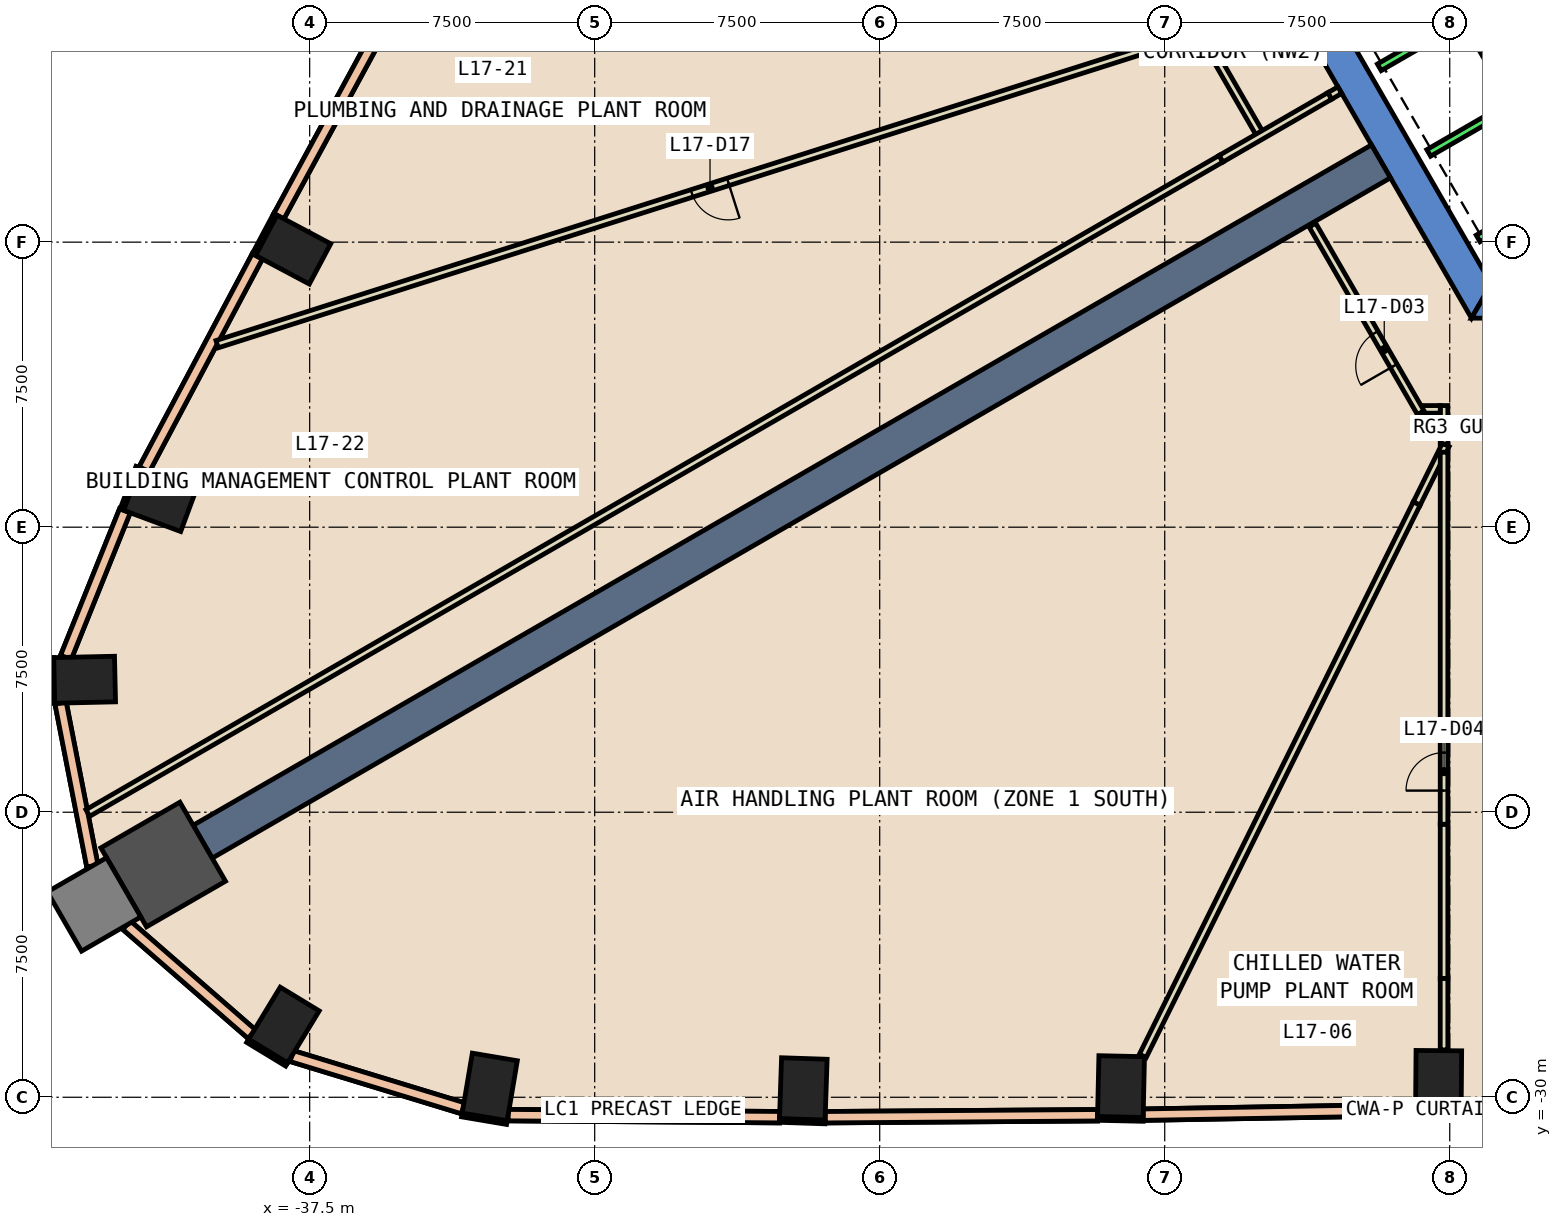
"""IFC4 building model, lengths in metres.
Left out: names, types, materials, properties, quantities, classifications, styles, units other than length and angle.
Written with IfcOpenShell. Run it as: python <this file> out.ifc"""

import sys

from ifc_helpers import new_model, si_unit, direction, frame, frame_2d, origin, origin_2d, place, context, subcontext, project, spatial, polyline, rectangle, outline, extrude, element, fill, save


model = new_model("IFC4")
c1 = context("Model", 3, precision=1e-05, world=origin(), true_north=direction((0.0, 1.0)))
c2 = subcontext(c1, "Body", "Model", "MODEL_VIEW")
j1 = project(units=[si_unit("LENGTHUNIT", "METRE"), si_unit("PLANEANGLEUNIT", "RADIAN")], contexts=[c1])
p1 = place(None, origin())
s1 = spatial("IfcSite", under=j1, at=p1, CompositionType="ELEMENT")
p2 = place(p1, origin())
s2 = spatial("IfcBuilding", under=s1, at=p2, CompositionType="ELEMENT")
p3 = place(p2, frame((0.0, 0.0, 81.2)))
s3 = spatial("IfcBuildingStorey", under=s2, at=p3, CompositionType="ELEMENT", Elevation=81.2)
for number, where, z_axis, x_axis in (
    (1, (-32.761, -29.728, -0.6), (0.0, 0.0, 1.0), (-0.986, 0.167, 0.0)),
    (2, (-24.51, -29.78, -0.6), (0.0, 0.0, 1.0), (-0.999, 0.034, 0.0)),
    (3, (-16.15, -29.719, -0.6), (0.0, 0.0, 1.0), (-1.0, 0.022, 0.0)),
    (4, (-7.793, -29.573, -0.6), (0.0, 0.0, 1.0), (-1.0, 0.008, 0.0)),
    (5, (-37.934, -7.697, -0.6), (0.0, 0.0, 1.0), (0.469, 0.883, 0.0)),
    (6, (-41.435, -14.273, -0.6), (0.0, 0.0, 1.0), (0.348, 0.937, 0.0)),
    (7, (-43.422, -19.014, -0.6), (0.0, 0.0, 1.0), (-0.023, 1.0, 0.0)),
):
    element("IfcColumn", number, at=place(p3, frame(where, z_axis=z_axis, x_axis=x_axis)), inside=s3, PredefinedType="COLUMN", context=c2, shape_type="SweptSolid", body=[
        extrude(rectangle(XDim=1.2, YDim=1.6, at=origin_2d()), origin(), (0.0, 0.0, 1.0), 5.4),
    ])
p4 = place(p3, frame((-41.354, -23.876, -0.6), z_axis=(0.0, 0.0, 1.0), x_axis=(0.866025403784, 0.5, 0.0)))
e8 = element("IfcColumn", 8, at=p4, inside=s3, PredefinedType="COLUMN", context=c2, shape_type="SweptSolid", body=[
    extrude(rectangle(XDim=2.4, YDim=2.4, at=origin_2d()), origin(), (0.0, 0.0, 1.0), 5.4),
])
p5 = place(p3, frame((-38.177, -28.099, -0.6), z_axis=(0.0, 0.0, 1.0), x_axis=(-0.854522294989, 0.519414716163, 0.0)))
e9 = element("IfcColumn", 9, at=p5, inside=s3, PredefinedType="COLUMN", context=c2, shape_type="SweptSolid", body=[
    extrude(rectangle(XDim=1.2, YDim=1.6, at=origin_2d()), origin(), (0.0, 0.0, 1.0), 5.4),
])
p6 = place(p3, frame((-43.173, -24.926, -0.6), z_axis=(0.0, 0.0, 1.0), x_axis=(0.866025403784, 0.5, 0.0)))
e10 = element("IfcColumn", 10, at=p6, inside=s3, PredefinedType="COLUMN", context=c2, shape_type="SweptSolid", body=[
    extrude(rectangle(XDim=1.8, YDim=1.8, at=origin_2d()), origin(), (0.0, 0.0, 1.0), 5.4),
])
p7 = place(p3, frame((0.0, 0.0, -0.6)))
e11 = element("IfcWall", 11, at=p7, inside=s3, PredefinedType="SHEAR", context=c2, shape_type="SweptSolid", body=[
    extrude(outline(polyline([(-13.856, 2.5), (-6.928, -9.5), (-6.409, -8.6), (-12.817, 2.5), (-13.856, 2.5)])), origin(), (0.0, 0.0, 1.0), 5.4),
])
p8 = place(p3, frame((0.0, 0.0, -0.6)))
e12 = element("IfcWall", 12, at=p8, inside=s3, PredefinedType="SHEAR", context=c2, shape_type="SweptSolid", body=[
    extrude(outline(polyline([(3.75, -9.5), (3.75, -8.6), (-6.409, -8.6), (-6.928, -9.5), (3.75, -9.5)])), origin(), (0.0, 0.0, 1.0), 5.4),
])
p9 = place(p3, frame((-9.31, -5.375, 0.0), z_axis=(0.0, 0.0, 1.0), x_axis=(-0.866022967049, -0.500004220526, 0.0)))
e13 = element("IfcWall", 13, at=p9, inside=s3, PredefinedType="SHEAR", context=c2, shape_type="SweptSolid", body=[
    extrude(rectangle(XDim=35.802, YDim=1.0, at=frame_2d((17.901, 0.0))), origin(), (0.0, 0.0, 1.0), 4.8),
])
p10 = place(p3, frame((-38.403, -6.769, 0.0), z_axis=(0.0, 0.0, 1.0), x_axis=(-0.469467784567, -0.882949601763, 0.0)))
e14 = element("IfcWall", 14, at=p10, inside=s3, PredefinedType="STANDARD", context=c2, shape_type="SweptSolid", body=[
    extrude(rectangle(XDim=1.199, YDim=0.1, at=frame_2d((0.6, 0.0))), origin(), (0.0, 0.0, 1.0), 4.8),
])
p11 = place(p3, frame((-42.023, -13.415, 0.0), z_axis=(0.0, 0.0, 1.0), x_axis=(-0.348268249601, -0.937394914814, 0.0)))
e15 = element("IfcWall", 15, at=p11, inside=s3, PredefinedType="STANDARD", context=c2, shape_type="SweptSolid", body=[
    extrude(rectangle(XDim=1.2, YDim=0.1, at=frame_2d((0.6, 0.0))), origin(), (0.0, 0.0, 1.0), 4.8),
])
for number, where, z_axis, x_axis in (
    (16, (-33.494, -30.466, 0.0), (0.0, 0.0, 1.0), (0.986, -0.167, 0.0)),
    (17, (-25.138, -30.609, 0.0), (0.0, 0.0, 1.0), (0.999, -0.033, 0.0)),
):
    element("IfcWall", number, at=place(p3, frame(where, z_axis=z_axis, x_axis=x_axis)), inside=s3, PredefinedType="STANDARD", context=c2, shape_type="SweptSolid", body=[
        extrude(rectangle(XDim=1.2, YDim=0.1, at=frame_2d((0.6, 0.0))), origin(), (0.0, 0.0, 1.0), 4.8),
    ])
p12 = place(p3, frame((-16.769, -30.556, 0.0), z_axis=(0.0, 0.0, 1.0), x_axis=(0.999763115755, -0.021764934565, 0.0)))
e18 = element("IfcWall", 18, at=p12, inside=s3, PredefinedType="STANDARD", context=c2, shape_type="SweptSolid", body=[
    extrude(rectangle(XDim=1.2, YDim=0.1, at=frame_2d((0.6, 0.0))), origin(), (0.0, 0.0, 1.0), 4.8),
])
p13 = place(p3, frame((-8.4, -30.418, 0.0), z_axis=(0.0, 0.0, 1.0), x_axis=(0.999965208912, -0.008341520563, 0.0)))
e19 = element("IfcWall", 19, at=p13, inside=s3, PredefinedType="STANDARD", context=c2, shape_type="SweptSolid", body=[
    extrude(rectangle(XDim=1.2, YDim=0.1, at=frame_2d((0.6, 0.0))), origin(), (0.0, 0.0, 1.0), 4.8),
])
p14 = place(p3, frame((-44.286, -18.433, 0.0), z_axis=(0.0, 0.0, 1.0), x_axis=(0.023188066684, -0.999731120634, 0.0)))
e20 = element("IfcWall", 20, at=p14, inside=s3, PredefinedType="STANDARD", context=c2, shape_type="SweptSolid", body=[
    extrude(rectangle(XDim=1.2, YDim=0.1, at=frame_2d((0.6, 0.0))), origin(), (0.0, 0.0, 1.0), 4.8),
])
p15 = place(p3, frame((-39.131, -28.514, 0.0), z_axis=(0.0, 0.0, 1.0), x_axis=(0.854771404281, -0.51900466898, 0.0)))
e21 = element("IfcWall", 21, at=p15, inside=s3, PredefinedType="STANDARD", context=c2, shape_type="SweptSolid", body=[
    extrude(rectangle(XDim=1.2, YDim=0.1, at=frame_2d((0.6, 0.0))), origin(), (0.0, 0.0, 1.0), 4.8),
])
p16 = place(p3, frame((-32.279, -30.47, 0.0), z_axis=(0.0, 0.0, 1.0), x_axis=(0.999971489211, -0.007551209565, 0.0)))
e22 = element("IfcWall", 22, at=p16, inside=s3, PredefinedType="STANDARD", context=c2, shape_type="SweptSolid", body=[
    extrude(rectangle(XDim=7.145, YDim=0.3, at=frame_2d((3.573, 0.0))), origin(), (0.0, 0.0, 1.0), 1.2),
])
p17 = place(p3, frame((-32.279, -30.47, 4.0), z_axis=(0.0, 0.0, 1.0), x_axis=(0.999971489211, -0.007551209565, 0.0)))
e23 = element("IfcWall", 23, at=p17, inside=s3, PredefinedType="STANDARD", context=c2, shape_type="SweptSolid", body=[
    extrude(rectangle(XDim=7.145, YDim=0.3, at=frame_2d((3.573, 0.0))), origin(), (0.0, 0.0, 1.0), 0.8),
])
p18 = place(p3, frame((-23.935, -30.525, 0.0), z_axis=(0.0, 0.0, 1.0), x_axis=(0.999973692375, 0.007253589309, 0.0)))
e24 = element("IfcWall", 24, at=p18, inside=s3, PredefinedType="STANDARD", context=c2, shape_type="SweptSolid", body=[
    extrude(rectangle(XDim=7.169, YDim=0.3, at=frame_2d((3.584, 0.0))), origin(), (0.0, 0.0, 1.0), 1.2),
])
p19 = place(p3, frame((-23.935, -30.525, 4.0), z_axis=(0.0, 0.0, 1.0), x_axis=(0.999973692375, 0.007253589309, 0.0)))
e25 = element("IfcWall", 25, at=p19, inside=s3, PredefinedType="STANDARD", context=c2, shape_type="SweptSolid", body=[
    extrude(rectangle(XDim=7.169, YDim=0.3, at=frame_2d((3.584, 0.0))), origin(), (0.0, 0.0, 1.0), 0.8),
])
p20 = place(p3, frame((-15.567, -30.458, 0.0), z_axis=(0.0, 0.0, 1.0), x_axis=(0.999848022085, 0.017433666643, 0.0)))
e26 = element("IfcWall", 26, at=p20, inside=s3, PredefinedType="STANDARD", context=c2, shape_type="SweptSolid", body=[
    extrude(rectangle(XDim=7.17, YDim=0.3, at=frame_2d((3.585, 0.0))), origin(), (0.0, 0.0, 1.0), 1.2),
])
p21 = place(p3, frame((-15.567, -30.458, 4.0), z_axis=(0.0, 0.0, 1.0), x_axis=(0.999848022085, 0.017433666643, 0.0)))
e27 = element("IfcWall", 27, at=p21, inside=s3, PredefinedType="STANDARD", context=c2, shape_type="SweptSolid", body=[
    extrude(rectangle(XDim=7.17, YDim=0.3, at=frame_2d((3.585, 0.0))), origin(), (0.0, 0.0, 1.0), 0.8),
])
p22 = place(p3, frame((-35.386, -1.426, 0.0), z_axis=(0.0, 0.0, 1.0), x_axis=(-0.476762519224, -0.879032138356, 0.0)))
e28 = element("IfcWall", 28, at=p22, inside=s3, PredefinedType="STANDARD", context=c2, shape_type="SweptSolid", body=[
    extrude(rectangle(XDim=6.135, YDim=0.3, at=frame_2d((3.068, 0.0))), origin(), (0.0, 0.0, 1.0), 1.2),
])
p23 = place(p3, frame((-35.386, -1.426, 4.0), z_axis=(0.0, 0.0, 1.0), x_axis=(-0.476762519224, -0.879032138356, 0.0)))
e29 = element("IfcWall", 29, at=p23, inside=s3, PredefinedType="STANDARD", context=c2, shape_type="SweptSolid", body=[
    extrude(rectangle(XDim=6.135, YDim=0.3, at=frame_2d((3.068, 0.0))), origin(), (0.0, 0.0, 1.0), 0.8),
])
p24 = place(p3, frame((-38.877, -7.874, 0.0), z_axis=(0.0, 0.0, 1.0), x_axis=(-0.469082096551, -0.883154565575, 0.0)))
e30 = element("IfcWall", 30, at=p24, inside=s3, PredefinedType="STANDARD", context=c2, shape_type="SweptSolid", body=[
    extrude(rectangle(XDim=6.346, YDim=0.3, at=frame_2d((3.173, 0.0))), origin(), (0.0, 0.0, 1.0), 1.2),
])
p25 = place(p3, frame((-38.877, -7.874, 4.0), z_axis=(0.0, 0.0, 1.0), x_axis=(-0.469082096551, -0.883154565575, 0.0)))
e31 = element("IfcWall", 31, at=p25, inside=s3, PredefinedType="STANDARD", context=c2, shape_type="SweptSolid", body=[
    extrude(rectangle(XDim=6.346, YDim=0.3, at=frame_2d((3.173, 0.0))), origin(), (0.0, 0.0, 1.0), 0.8),
])
p26 = place(p3, frame((-42.362, -14.568, 0.0), z_axis=(0.0, 0.0, 1.0), x_axis=(-0.373424226069, -0.92766068548, 0.0)))
e32 = element("IfcWall", 32, at=p26, inside=s3, PredefinedType="STANDARD", context=c2, shape_type="SweptSolid", body=[
    extrude(rectangle(XDim=4.159, YDim=0.3, at=frame_2d((2.079, 0.0))), origin(), (0.0, 0.0, 1.0), 1.2),
])
p27 = place(p3, frame((-42.362, -14.568, 4.0), z_axis=(0.0, 0.0, 1.0), x_axis=(-0.373424226069, -0.92766068548, 0.0)))
e33 = element("IfcWall", 33, at=p27, inside=s3, PredefinedType="STANDARD", context=c2, shape_type="SweptSolid", body=[
    extrude(rectangle(XDim=4.159, YDim=0.3, at=frame_2d((2.079, 0.0))), origin(), (0.0, 0.0, 1.0), 0.8),
])
p28 = place(p3, frame((-44.054, -19.627, 0.0), z_axis=(0.0, 0.0, 1.0), x_axis=(0.191384281913, -0.981515184109, 0.0)))
e34 = element("IfcWall", 34, at=p28, inside=s3, PredefinedType="STANDARD", context=c2, shape_type="SweptSolid", body=[
    extrude(rectangle(XDim=4.368, YDim=0.3, at=frame_2d((2.184, 0.0))), origin(), (0.0, 0.0, 1.0), 1.2),
])
p29 = place(p3, frame((-44.054, -19.627, 4.0), z_axis=(0.0, 0.0, 1.0), x_axis=(0.191384281913, -0.981515184109, 0.0)))
e35 = element("IfcWall", 35, at=p29, inside=s3, PredefinedType="STANDARD", context=c2, shape_type="SweptSolid", body=[
    extrude(rectangle(XDim=4.368, YDim=0.3, at=frame_2d((2.184, 0.0))), origin(), (0.0, 0.0, 1.0), 0.8),
])
p30 = place(p3, frame((-42.319, -25.471, 0.0), z_axis=(0.0, 0.0, 1.0), x_axis=(0.754384139839, -0.656433217897, 0.0)))
e36 = element("IfcWall", 36, at=p30, inside=s3, PredefinedType="STANDARD", context=c2, shape_type="SweptSolid", body=[
    extrude(rectangle(XDim=4.369, YDim=0.3, at=frame_2d((2.185, 0.0))), origin(), (0.0, 0.0, 1.0), 1.2),
])
p31 = place(p3, frame((-42.319, -25.471, 4.0), z_axis=(0.0, 0.0, 1.0), x_axis=(0.754384139839, -0.656433217897, 0.0)))
e37 = element("IfcWall", 37, at=p31, inside=s3, PredefinedType="STANDARD", context=c2, shape_type="SweptSolid", body=[
    extrude(rectangle(XDim=4.369, YDim=0.3, at=frame_2d((2.185, 0.0))), origin(), (0.0, 0.0, 1.0), 0.8),
])
p32 = place(p3, frame((-37.972, -28.916, 0.0), z_axis=(0.0, 0.0, 1.0), x_axis=(0.956550822453, -0.291565642806, 0.0)))
e38 = element("IfcWall", 38, at=p32, inside=s3, PredefinedType="STANDARD", context=c2, shape_type="SweptSolid", body=[
    extrude(rectangle(XDim=4.713, YDim=0.3, at=frame_2d((2.356, 0.0))), origin(), (0.0, 0.0, 1.0), 1.2),
])
p33 = place(p3, frame((-37.972, -28.916, 4.0), z_axis=(0.0, 0.0, 1.0), x_axis=(0.956550822453, -0.291565642806, 0.0)))
e39 = element("IfcWall", 39, at=p33, inside=s3, PredefinedType="STANDARD", context=c2, shape_type="SweptSolid", body=[
    extrude(rectangle(XDim=4.713, YDim=0.3, at=frame_2d((2.356, 0.0))), origin(), (0.0, 0.0, 1.0), 0.8),
])
p34 = place(p3, frame((-5.492, -3.788, 0.0), z_axis=(0.0, 0.0, 1.0), x_axis=(-0.500008949224, 0.866020236886, 0.0)))
e40 = element("IfcWall", 40, at=p34, inside=s3, PredefinedType="PARTITIONING", context=c2, shape_type="SweptSolid", body=[
    extrude(rectangle(XDim=2.68, YDim=0.2, at=frame_2d((1.34, 0.0))), origin(), (0.0, 0.0, 1.0), 4.8),
])
p35 = place(p3, frame((-7.65, -12.826, 0.0), z_axis=(0.0, 0.0, 1.0), x_axis=(0.0, 1.0, 0.0)))
e41 = element("IfcWall", 41, at=p35, inside=s3, PredefinedType="PARTITIONING", context=c2, shape_type="SweptSolid", body=[
    extrude(rectangle(XDim=1.026, YDim=0.2, at=frame_2d((0.513, 0.0))), origin(), (0.0, 0.0, 1.0), 2.4),
])
p36 = place(p3, frame((-7.75, -11.9, 0.0), z_axis=(0.0, 0.0, 1.0), x_axis=(-1.0, 0.0, 0.0)))
e42 = element("IfcWall", 42, at=p36, inside=s3, PredefinedType="PARTITIONING", context=c2, shape_type="SweptSolid", body=[
    extrude(rectangle(XDim=0.464, YDim=0.2, at=frame_2d((0.232, 0.0))), origin(), (0.0, 0.0, 1.0), 2.4),
])
p37 = place(p3, frame((-8.264, -11.987, 0.0), z_axis=(0.0, 0.0, 1.0), x_axis=(-0.499907863044, 0.866078592546, 0.0)))
e43 = element("IfcWall", 43, at=p37, inside=s3, PredefinedType="PARTITIONING", context=c2, shape_type="SweptSolid", body=[
    extrude(rectangle(XDim=5.699, YDim=0.2, at=frame_2d((2.85, 0.0))), origin(), (0.0, 0.0, 1.0), 4.8),
])
p38 = place(p37, frame((1.419, 0.0, 0.0)))
e44 = element("IfcOpeningElement", 44, at=p38, cuts=e43, PredefinedType="OPENING", context=c2, shape_type="SweptSolid", body=[
    extrude(rectangle(XDim=1.0, YDim=2.1, at=frame_2d((0.5, 1.05))), frame((0.0, 0.11, 0.0), z_axis=(0.0, -1.0, 0.0), x_axis=(1.0, 0.0, 0.0)), (0.0, 0.0, 1.0), 0.22),
])
p39 = place(p3, frame((-7.65, -28.754, 0.0), z_axis=(0.0, 0.0, 1.0), x_axis=(0.0, 1.0, 0.0)))
e45 = element("IfcWall", 45, at=p39, inside=s3, PredefinedType="PARTITIONING", context=c2, shape_type="SweptSolid", body=[
    extrude(rectangle(XDim=1.882, YDim=0.2, at=frame_2d((0.941, 0.0))), origin(), (0.0, 0.0, 1.0), 4.8),
])
p40 = place(p3, frame((-7.606, -12.836, 0.0), z_axis=(0.0, 0.0, 1.0), x_axis=(-0.444033028639, -0.896010418175, 0.0)))
e46 = element("IfcWall", 46, at=p40, inside=s3, PredefinedType="PARTITIONING", context=c2, shape_type="SweptSolid", body=[
    extrude(rectangle(XDim=1.721, YDim=0.2, at=frame_2d((0.86, 0.0))), origin(), (0.0, 0.0, 1.0), 2.4),
])
p41 = place(p3, frame((-10.392, -3.5, 0.0), z_axis=(0.0, 0.0, 1.0), x_axis=(-0.866040446274, -0.499973944738, 0.0)))
e47 = element("IfcWall", 47, at=p41, inside=s3, PredefinedType="PARTITIONING", context=c2, shape_type="SweptSolid", body=[
    extrude(rectangle(XDim=0.308, YDim=0.2, at=frame_2d((0.154, 0.0))), origin(), (0.0, 0.0, 1.0), 1.7),
])
p42 = place(p3, frame((-43.337, -22.52, 0.0), z_axis=(0.0, 0.0, 1.0), x_axis=(0.866035864772, 0.4999818806, 0.0)))
e48 = element("IfcWall", 48, at=p42, inside=s3, PredefinedType="PARTITIONING", context=c2, shape_type="SweptSolid", body=[
    extrude(rectangle(XDim=34.431, YDim=0.2, at=frame_2d((17.216, 0.0))), origin(), (0.0, 0.0, 1.0), 4.8),
])
p43 = place(p3, frame((-12.471, -4.7, 0.0), z_axis=(0.0, 0.0, 1.0), x_axis=(-0.49990916997, 0.866077838176, 0.0)))
e49 = element("IfcWall", 49, at=p43, inside=s3, PredefinedType="PARTITIONING", context=c2, shape_type="SweptSolid", body=[
    extrude(rectangle(XDim=8.414, YDim=0.2, at=frame_2d((4.207, 0.0))), origin(), (0.0, 0.0, 1.0), 4.8),
])
p44 = place(p43, frame((4.362, 0.0, 0.0)))
e50 = element("IfcOpeningElement", 50, at=p44, cuts=e49, PredefinedType="OPENING", context=c2, shape_type="SweptSolid", body=[
    extrude(rectangle(XDim=1.0, YDim=2.1, at=frame_2d((0.5, 1.05))), frame((0.0, 0.11, 0.0), z_axis=(0.0, -1.0, 0.0), x_axis=(1.0, 0.0, 0.0)), (0.0, 0.0, 1.0), 0.22),
])
p45 = place(p3, frame((-14.051, -1.963, 0.0), z_axis=(0.0, 0.0, 1.0), x_axis=(-0.953071002878, -0.302746863687, 0.0)))
e51 = element("IfcWall", 51, at=p45, inside=s3, PredefinedType="PARTITIONING", context=c2, shape_type="SweptSolid", body=[
    extrude(rectangle(XDim=27.158, YDim=0.2, at=frame_2d((13.579, 0.0))), origin(), (0.0, 0.0, 1.0), 4.8),
])
p46 = place(p45, frame((13.05, 0.0, 0.0)))
e52 = element("IfcOpeningElement", 52, at=p46, cuts=e51, PredefinedType="OPENING", context=c2, shape_type="SweptSolid", body=[
    extrude(rectangle(XDim=1.0, YDim=2.1, at=frame_2d((0.5, 1.05))), frame((0.0, 0.11, 0.0), z_axis=(0.0, -1.0, 0.0), x_axis=(1.0, 0.0, 0.0)), (0.0, 0.0, 1.0), 0.22),
])
p47 = place(p3, frame((-7.65, -26.872, 0.0), z_axis=(0.0, 0.0, 1.0), x_axis=(0.0, 1.0, 0.0)))
e53 = element("IfcWall", 53, at=p47, inside=s3, PredefinedType="PARTITIONING", context=c2, shape_type="SweptSolid", body=[
    extrude(rectangle(XDim=4.056, YDim=0.2, at=frame_2d((2.028, 0.0))), origin(), (0.0, 0.0, 1.0), 2.4),
])
p48 = place(p3, frame((-7.65, -22.816, 0.0), z_axis=(0.0, 0.0, 1.0), x_axis=(0.0, 1.0, 0.0)))
e54 = element("IfcWall", 54, at=p48, inside=s3, PredefinedType="PARTITIONING", context=c2, shape_type="SweptSolid", body=[
    extrude(rectangle(XDim=9.79, YDim=0.2, at=frame_2d((4.895, 0.0))), origin(), (0.0, 0.0, 1.0), 4.8),
])
p49 = place(p48, frame((0.885, 0.0, 0.0)))
e55 = element("IfcOpeningElement", 55, at=p49, cuts=e54, PredefinedType="OPENING", context=c2, shape_type="SweptSolid", body=[
    extrude(rectangle(XDim=1.0, YDim=2.1, at=frame_2d((0.5, 1.05))), frame((0.0, 0.11, 0.0), z_axis=(0.0, -1.0, 0.0), x_axis=(1.0, 0.0, 0.0)), (0.0, 0.0, 1.0), 0.22),
])
p50 = place(p3, frame((-8.37, -14.378, 0.0), z_axis=(0.0, 0.0, 1.0), x_axis=(-0.444267350834, -0.895894257702, 0.0)))
e56 = element("IfcWall", 56, at=p50, inside=s3, PredefinedType="PARTITIONING", context=c2, shape_type="SweptSolid", body=[
    extrude(rectangle(XDim=16.222, YDim=0.2, at=frame_2d((8.111, 0.0))), origin(), (0.0, 0.0, 1.0), 4.8),
])
p51 = place(p3, frame((-10.659, -3.654, 0.0), z_axis=(0.0, 0.0, 1.0), x_axis=(-0.866004557827, -0.500036104519, 0.0)))
e57 = element("IfcWall", 57, at=p51, inside=s3, PredefinedType="PARTITIONING", context=c2, shape_type="SweptSolid", body=[
    extrude(rectangle(XDim=3.302, YDim=0.2, at=frame_2d((1.651, 0.0))), origin(), (0.0, 0.0, 1.0), 4.8),
])
p52 = place(p3, frame((-9.751, 2.99, 0.0), z_axis=(0.0, 0.0, 1.0), x_axis=(0.50000090737, -0.866024879913, 0.0)))
e58 = element("IfcWall", 58, at=p52, inside=s3, PredefinedType="STANDARD", context=c2, shape_type="SweptSolid", body=[
    extrude(rectangle(XDim=10.6, YDim=0.2, at=frame_2d((5.3, 0.0))), origin(), (0.0, 0.0, 1.0), 4.8),
])
for number, where, z_axis, x_axis in (
    (59, (-7.188, -1.65, 0.0), (0.0, 0.0, 1.0), (-0.866, -0.5, 0.0)),
    (60, (-5.888, -3.902, 0.0), (0.0, 0.0, 1.0), (-0.866, -0.5, 0.0)),
    (61, (-4.588, -6.153, 0.0), (0.0, 0.0, 1.0), (-0.866, -0.5, 0.0)),
):
    element("IfcWall", number, at=place(p3, frame(where, z_axis=z_axis, x_axis=x_axis)), inside=s3, PredefinedType="STANDARD", context=c2, shape_type="SweptSolid", body=[
        extrude(rectangle(XDim=2.5, YDim=0.2, at=frame_2d((1.25, 0.0))), origin(), (0.0, 0.0, 1.0), 4.8),
    ])
p53 = place(p38, origin())
e62 = element("IfcDoor", 62, at=p53, inside=s3, OperationType="SINGLE_SWING_LEFT", PredefinedType="DOOR", context=c2, shape_type="SweptSolid", body=[
    extrude(rectangle(XDim=1.0, YDim=2.1, at=frame_2d((0.5, 1.05))), frame((0.0, 0.025, 0.0), z_axis=(0.0, -1.0, 0.0), x_axis=(1.0, 0.0, 0.0)), (0.0, 0.0, 1.0), 0.05),
])
fill(e44, e62)
p54 = place(p49, origin())
e63 = element("IfcDoor", 63, at=p54, inside=s3, OperationType="SINGLE_SWING_RIGHT", PredefinedType="DOOR", context=c2, shape_type="SweptSolid", body=[
    extrude(rectangle(XDim=1.0, YDim=2.1, at=frame_2d((0.5, 1.05))), frame((0.0, 0.025, 0.0), z_axis=(0.0, -1.0, 0.0), x_axis=(1.0, 0.0, 0.0)), (0.0, 0.0, 1.0), 0.05),
])
fill(e55, e63)
p55 = place(p46, origin())
e64 = element("IfcDoor", 64, at=p55, inside=s3, OperationType="SINGLE_SWING_LEFT", PredefinedType="DOOR", context=c2, shape_type="SweptSolid", body=[
    extrude(rectangle(XDim=1.0, YDim=2.1, at=frame_2d((0.5, 1.05))), frame((0.0, 0.025, 0.0), z_axis=(0.0, -1.0, 0.0), x_axis=(1.0, 0.0, 0.0)), (0.0, 0.0, 1.0), 0.05),
])
fill(e52, e64)
save(model, sys.argv[1])
